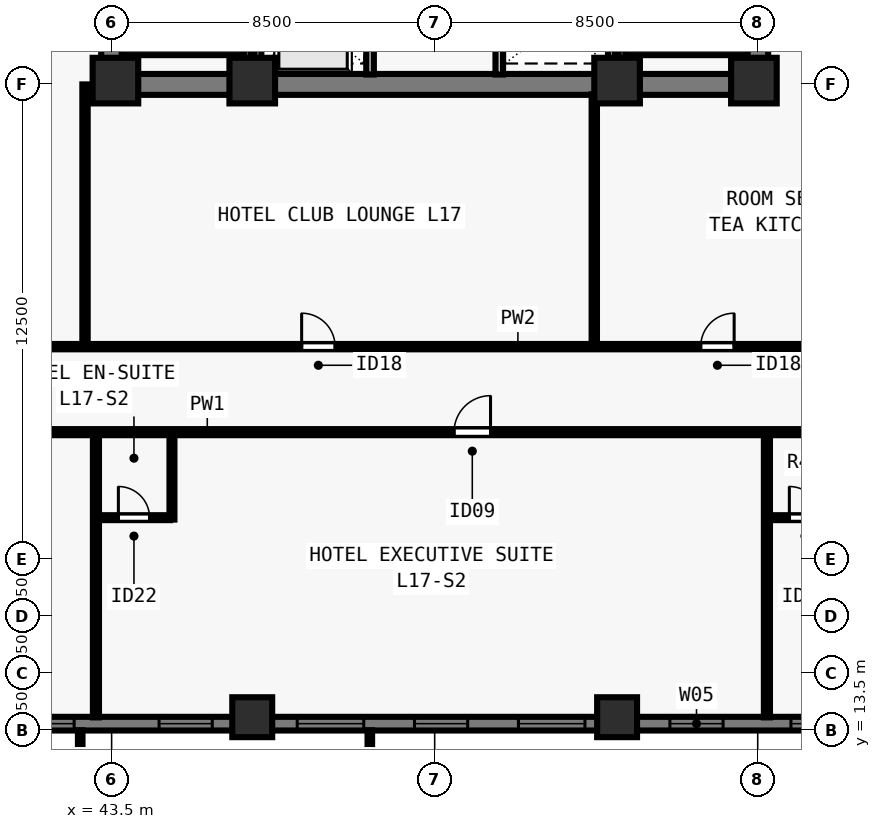
"""IFC4 building model, lengths in metres.
Left out: names, types, materials, properties, quantities, classifications, styles, units other than length and angle.
Written with IfcOpenShell. Run it as: python <this file> out.ifc"""

import sys

from ifc_helpers import new_model, si_unit, direction, frame, frame_2d, origin, origin_2d, place, context, subcontext, project, spatial, rectangle, extrude, element, fill, save


model = new_model("IFC4")
c1 = context("Model", 3, precision=1e-05, world=origin(), true_north=direction((0.0, 1.0)))
c2 = subcontext(c1, "Body", "Model", "MODEL_VIEW")
j1 = project(units=[si_unit("LENGTHUNIT", "METRE"), si_unit("PLANEANGLEUNIT", "RADIAN")], contexts=[c1])
p1 = place(None, origin())
s1 = spatial("IfcSite", under=j1, at=p1, CompositionType="ELEMENT")
p2 = place(p1, origin())
s2 = spatial("IfcBuilding", under=s1, at=p2, CompositionType="ELEMENT")
p3 = place(p2, frame((0.0, 0.0, 65.5)))
s3 = spatial("IfcBuildingStorey", under=s2, at=p3, CompositionType="ELEMENT", Elevation=65.5)
for number, where, z_axis, x_axis in (
    (1, (43.6, 30.6, 0.0), (0.0, 0.0, 1.0), (1.0, 0.0, 0.0)),
    (2, (47.2, 30.6, 0.0), (0.0, 0.0, 1.0), (1.0, 0.0, 0.0)),
    (3, (56.8, 30.6, 0.0), (0.0, 0.0, 1.0), (1.0, 0.0, 0.0)),
    (4, (60.4, 30.6, 0.0), (0.0, 0.0, 1.0), (1.0, 0.0, 0.0)),
):
    element("IfcColumn", number, at=place(p3, frame(where, z_axis=z_axis, x_axis=x_axis)), inside=s3, PredefinedType="COLUMN", context=c2, shape_type="SweptSolid", body=[
        extrude(rectangle(XDim=1.2, YDim=1.2, at=origin_2d()), origin(), (0.0, 0.0, 1.0), 3.5),
    ])
for number, where, z_axis, x_axis in (
    (5, (47.2, 13.85, 0.0), (0.0, 0.0, 1.0), (1.0, 0.0, 0.0)),
    (6, (56.8, 13.85, 0.0), (0.0, 0.0, 1.0), (1.0, 0.0, 0.0)),
):
    element("IfcColumn", number, at=place(p3, frame(where, z_axis=z_axis, x_axis=x_axis)), inside=s3, PredefinedType="COLUMN", context=c2, shape_type="SweptSolid", body=[
        extrude(rectangle(XDim=1.05, YDim=1.05, at=origin_2d()), origin(), (0.0, 0.0, 1.0), 3.5),
    ])
p4 = place(p3, frame((74.5, 13.68, 0.0), z_axis=(0.0, 0.0, 1.0), x_axis=(-1.0, 0.0, 0.0)))
e7 = element("IfcWall", 7, at=p4, inside=s3, PredefinedType="SOLIDWALL", context=c2, shape_type="SweptSolid", body=[
    extrude(rectangle(XDim=44.662, YDim=0.36, at=frame_2d((22.331, 0.0))), origin(), (0.0, 0.0, 1.0), 3.28),
])
p5 = place(p4, frame((4.655, 0.0, 0.8)))
e8 = element("IfcOpeningElement", 8, at=p5, cuts=e7, PredefinedType="OPENING", context=c2, shape_type="SweptSolid", body=[
    extrude(rectangle(XDim=1.75, YDim=1.544, at=frame_2d((0.875, 0.772))), frame((0.0, 0.19, 0.0), z_axis=(0.0, -1.0, 0.0), x_axis=(1.0, 0.0, 0.0)), (0.0, 0.0, 1.0), 0.38),
])
p6 = place(p4, frame((8.19, 0.0, 0.8)))
e9 = element("IfcOpeningElement", 9, at=p6, cuts=e7, PredefinedType="OPENING", context=c2, shape_type="SweptSolid", body=[
    extrude(rectangle(XDim=1.4, YDim=1.544, at=frame_2d((0.7, 0.772))), frame((0.0, 0.19, 0.0), z_axis=(0.0, -1.0, 0.0), x_axis=(1.0, 0.0, 0.0)), (0.0, 0.0, 1.0), 0.38),
])
p7 = place(p4, frame((11.375, 0.0, 0.8)))
e10 = element("IfcOpeningElement", 10, at=p7, cuts=e7, PredefinedType="OPENING", context=c2, shape_type="SweptSolid", body=[
    extrude(rectangle(XDim=1.75, YDim=1.544, at=frame_2d((0.875, 0.772))), frame((0.0, 0.19, 0.0), z_axis=(0.0, -1.0, 0.0), x_axis=(1.0, 0.0, 0.0)), (0.0, 0.0, 1.0), 0.38),
])
p8 = place(p4, frame((14.911, 0.0, 0.8)))
e11 = element("IfcOpeningElement", 11, at=p8, cuts=e7, PredefinedType="OPENING", context=c2, shape_type="SweptSolid", body=[
    extrude(rectangle(XDim=1.4, YDim=1.544, at=frame_2d((0.7, 0.772))), frame((0.0, 0.19, 0.0), z_axis=(0.0, -1.0, 0.0), x_axis=(1.0, 0.0, 0.0)), (0.0, 0.0, 1.0), 0.38),
])
p9 = place(p4, frame((18.546, 0.0, 0.8)))
e12 = element("IfcOpeningElement", 12, at=p9, cuts=e7, PredefinedType="OPENING", context=c2, shape_type="SweptSolid", body=[
    extrude(rectangle(XDim=1.75, YDim=1.544, at=frame_2d((0.875, 0.772))), frame((0.0, 0.19, 0.0), z_axis=(0.0, -1.0, 0.0), x_axis=(1.0, 0.0, 0.0)), (0.0, 0.0, 1.0), 0.38),
])
p10 = place(p4, frame((21.631, 0.0, 0.8)))
e13 = element("IfcOpeningElement", 13, at=p10, cuts=e7, PredefinedType="OPENING", context=c2, shape_type="SweptSolid", body=[
    extrude(rectangle(XDim=1.4, YDim=1.544, at=frame_2d((0.7, 0.772))), frame((0.0, 0.19, 0.0), z_axis=(0.0, -1.0, 0.0), x_axis=(1.0, 0.0, 0.0)), (0.0, 0.0, 1.0), 0.38),
])
p11 = place(p4, frame((24.366, 0.0, 0.8)))
e14 = element("IfcOpeningElement", 14, at=p11, cuts=e7, PredefinedType="OPENING", context=c2, shape_type="SweptSolid", body=[
    extrude(rectangle(XDim=1.75, YDim=1.544, at=frame_2d((0.875, 0.772))), frame((0.0, 0.19, 0.0), z_axis=(0.0, -1.0, 0.0), x_axis=(1.0, 0.0, 0.0)), (0.0, 0.0, 1.0), 0.38),
])
p12 = place(p4, frame((28.351, 0.0, 0.8)))
e15 = element("IfcOpeningElement", 15, at=p12, cuts=e7, PredefinedType="OPENING", context=c2, shape_type="SweptSolid", body=[
    extrude(rectangle(XDim=1.4, YDim=1.544, at=frame_2d((0.7, 0.772))), frame((0.0, 0.19, 0.0), z_axis=(0.0, -1.0, 0.0), x_axis=(1.0, 0.0, 0.0)), (0.0, 0.0, 1.0), 0.38),
])
p13 = place(p4, frame((31.987, 0.0, 0.8)))
e16 = element("IfcOpeningElement", 16, at=p13, cuts=e7, PredefinedType="OPENING", context=c2, shape_type="SweptSolid", body=[
    extrude(rectangle(XDim=1.75, YDim=1.544, at=frame_2d((0.875, 0.772))), frame((0.0, 0.19, 0.0), z_axis=(0.0, -1.0, 0.0), x_axis=(1.0, 0.0, 0.0)), (0.0, 0.0, 1.0), 0.38),
])
p14 = place(p4, frame((35.072, 0.0, 0.8)))
e17 = element("IfcOpeningElement", 17, at=p14, cuts=e7, PredefinedType="OPENING", context=c2, shape_type="SweptSolid", body=[
    extrude(rectangle(XDim=1.4, YDim=1.544, at=frame_2d((0.7, 0.772))), frame((0.0, 0.19, 0.0), z_axis=(0.0, -1.0, 0.0), x_axis=(1.0, 0.0, 0.0)), (0.0, 0.0, 1.0), 0.38),
])
p15 = place(p4, frame((38.257, 0.0, 0.8)))
e18 = element("IfcOpeningElement", 18, at=p15, cuts=e7, PredefinedType="OPENING", context=c2, shape_type="SweptSolid", body=[
    extrude(rectangle(XDim=1.75, YDim=1.544, at=frame_2d((0.875, 0.772))), frame((0.0, 0.19, 0.0), z_axis=(0.0, -1.0, 0.0), x_axis=(1.0, 0.0, 0.0)), (0.0, 0.0, 1.0), 0.38),
])
p16 = place(p3, frame((43.225, 30.5, 0.0), z_axis=(0.0, 0.0, 1.0), x_axis=(1.0, 0.0, 0.0)))
e19 = element("IfcWall", 19, at=p16, inside=s3, PredefinedType="SHEAR", context=c2, shape_type="SweptSolid", body=[
    extrude(rectangle(XDim=17.55, YDim=0.55, at=frame_2d((8.775, 0.0))), origin(), (0.0, 0.0, 1.0), 3.28),
])
for number, where, z_axis, x_axis in (
    (20, (43.5, 30.765, 0.0), (0.0, 0.0, 1.0), (0.0, 1.0, 0.0)),
    (21, (60.5, 30.765, 0.0), (0.0, 0.0, 1.0), (0.0, 1.0, 0.0)),
):
    element("IfcWall", number, at=place(p3, frame(where, z_axis=z_axis, x_axis=x_axis)), inside=s3, PredefinedType="SHEAR", context=c2, shape_type="SweptSolid", body=[
        extrude(rectangle(XDim=7.985, YDim=0.55, at=frame_2d((3.993, 0.0))), origin(), (0.0, 0.0, 1.0), 3.28),
    ])
p17 = place(p3, frame((50.3, 30.76, 0.0), z_axis=(0.0, 0.0, 1.0), x_axis=(0.0, 1.0, 0.0)))
e22 = element("IfcWall", 22, at=p17, inside=s3, PredefinedType="SOLIDWALL", context=c2, shape_type="SweptSolid", body=[
    extrude(rectangle(XDim=7.855, YDim=0.2, at=frame_2d((3.927, 0.0))), origin(), (0.0, 0.0, 1.0), 3.28),
])
p18 = place(p17, frame((0.79, 0.0, 0.0)))
e23 = element("IfcOpeningElement", 23, at=p18, cuts=e22, PredefinedType="OPENING", context=c2, shape_type="SweptSolid", body=[
    extrude(rectangle(XDim=1.1, YDim=2.2, at=frame_2d((0.55, 1.1))), frame((0.0, 0.11, 0.0), z_axis=(0.0, -1.0, 0.0), x_axis=(1.0, 0.0, 0.0)), (0.0, 0.0, 1.0), 0.22),
])
p19 = place(p17, frame((3.49, 0.0, 0.0)))
e24 = element("IfcOpeningElement", 24, at=p19, cuts=e22, PredefinedType="OPENING", context=c2, shape_type="SweptSolid", body=[
    extrude(rectangle(XDim=1.1, YDim=2.2, at=frame_2d((0.55, 1.1))), frame((0.0, 0.11, 0.0), z_axis=(0.0, -1.0, 0.0), x_axis=(1.0, 0.0, 0.0)), (0.0, 0.0, 1.0), 0.22),
])
p20 = place(p17, frame((6.19, 0.0, 0.0)))
e25 = element("IfcOpeningElement", 25, at=p20, cuts=e22, PredefinedType="OPENING", context=c2, shape_type="SweptSolid", body=[
    extrude(rectangle(XDim=1.1, YDim=2.2, at=frame_2d((0.55, 1.1))), frame((0.0, 0.11, 0.0), z_axis=(0.0, -1.0, 0.0), x_axis=(1.0, 0.0, 0.0)), (0.0, 0.0, 1.0), 0.22),
])
p21 = place(p3, frame((53.7, 30.76, 0.0), z_axis=(0.0, 0.0, 1.0), x_axis=(0.0, 1.0, 0.0)))
e26 = element("IfcWall", 26, at=p21, inside=s3, PredefinedType="SOLIDWALL", context=c2, shape_type="SweptSolid", body=[
    extrude(rectangle(XDim=7.855, YDim=0.2, at=frame_2d((3.927, 0.0))), origin(), (0.0, 0.0, 1.0), 3.28),
])
for number, where, z_axis, x_axis in (
    (27, (47.35, 30.76, 0.0), (0.0, 0.0, 1.0), (0.0, 1.0, 0.0)),
    (28, (56.65, 30.76, 0.0), (0.0, 0.0, 1.0), (0.0, 1.0, 0.0)),
):
    element("IfcWall", number, at=place(p3, frame(where, z_axis=z_axis, x_axis=x_axis)), inside=s3, PredefinedType="SOLIDWALL", context=c2, shape_type="SweptSolid", body=[
        extrude(rectangle(XDim=7.855, YDim=0.18, at=frame_2d((3.927, 0.0))), origin(), (0.0, 0.0, 1.0), 3.28),
    ])
p22 = place(p3, frame((34.95, 21.35, 0.0), z_axis=(0.0, 0.0, 1.0), x_axis=(1.0, 0.0, 0.0)))
e29 = element("IfcWall", 29, at=p22, inside=s3, PredefinedType="PARTITIONING", context=c2, shape_type="SweptSolid", body=[
    extrude(rectangle(XDim=34.1, YDim=0.16, at=frame_2d((17.05, 0.0))), origin(), (0.0, 0.0, 1.0), 3.28),
])
p23 = place(p22, frame((3.614, 0.0, 0.0)))
e30 = element("IfcOpeningElement", 30, at=p23, cuts=e29, PredefinedType="OPENING", context=c2, shape_type="SweptSolid", body=[
    extrude(rectangle(XDim=0.96, YDim=2.15, at=frame_2d((0.48, 1.075))), frame((0.0, 0.09, 0.0), z_axis=(0.0, -1.0, 0.0), x_axis=(1.0, 0.0, 0.0)), (0.0, 0.0, 1.0), 0.18),
])
p24 = place(p22, frame((17.56, 0.0, 0.0)))
e31 = element("IfcOpeningElement", 31, at=p24, cuts=e29, PredefinedType="OPENING", context=c2, shape_type="SweptSolid", body=[
    extrude(rectangle(XDim=0.96, YDim=2.15, at=frame_2d((0.48, 1.075))), frame((0.0, 0.09, 0.0), z_axis=(0.0, -1.0, 0.0), x_axis=(1.0, 0.0, 0.0)), (0.0, 0.0, 1.0), 0.18),
])
p25 = place(p22, frame((30.516, 0.0, 0.0)))
e32 = element("IfcOpeningElement", 32, at=p25, cuts=e29, PredefinedType="OPENING", context=c2, shape_type="SweptSolid", body=[
    extrude(rectangle(XDim=0.96, YDim=2.15, at=frame_2d((0.48, 1.075))), frame((0.0, 0.09, 0.0), z_axis=(0.0, -1.0, 0.0), x_axis=(1.0, 0.0, 0.0)), (0.0, 0.0, 1.0), 0.18),
])
p26 = place(p3, frame((37.2, 23.6, 0.0), z_axis=(0.0, 0.0, 1.0), x_axis=(1.0, 0.0, 0.0)))
e33 = element("IfcWall", 33, at=p26, inside=s3, PredefinedType="PARTITIONING", context=c2, shape_type="SweptSolid", body=[
    extrude(rectangle(XDim=29.6, YDim=0.14, at=frame_2d((14.8, 0.0))), origin(), (0.0, 0.0, 1.0), 3.28),
])
p27 = place(p26, frame((1.2, 0.0, 0.0)))
e34 = element("IfcOpeningElement", 34, at=p27, cuts=e33, PredefinedType="OPENING", context=c2, shape_type="SweptSolid", body=[
    extrude(rectangle(XDim=0.88, YDim=2.1, at=frame_2d((0.44, 1.05))), frame((0.0, 0.08, 0.0), z_axis=(0.0, -1.0, 0.0), x_axis=(1.0, 0.0, 0.0)), (0.0, 0.0, 1.0), 0.16),
])
p28 = place(p26, frame((11.3, 0.0, 0.0)))
e35 = element("IfcOpeningElement", 35, at=p28, cuts=e33, PredefinedType="OPENING", context=c2, shape_type="SweptSolid", body=[
    extrude(rectangle(XDim=0.88, YDim=2.1, at=frame_2d((0.44, 1.05))), frame((0.0, 0.08, 0.0), z_axis=(0.0, -1.0, 0.0), x_axis=(1.0, 0.0, 0.0)), (0.0, 0.0, 1.0), 0.16),
])
p29 = place(p26, frame((21.8, 0.0, 0.0)))
e36 = element("IfcOpeningElement", 36, at=p29, cuts=e33, PredefinedType="OPENING", context=c2, shape_type="SweptSolid", body=[
    extrude(rectangle(XDim=0.88, YDim=2.1, at=frame_2d((0.44, 1.05))), frame((0.0, 0.08, 0.0), z_axis=(0.0, -1.0, 0.0), x_axis=(1.0, 0.0, 0.0)), (0.0, 0.0, 1.0), 0.16),
])
p30 = place(p3, frame((42.8, 23.655, 0.0), z_axis=(0.0, 0.0, 1.0), x_axis=(0.0, 1.0, 0.0)))
e37 = element("IfcWall", 37, at=p30, inside=s3, PredefinedType="PARTITIONING", context=c2, shape_type="SweptSolid", body=[
    extrude(rectangle(XDim=6.845, YDim=0.14, at=frame_2d((3.422, 0.0))), origin(), (0.0, 0.0, 1.0), 2.439),
])
p31 = place(p3, frame((56.2, 23.655, 0.0), z_axis=(0.0, 0.0, 1.0), x_axis=(0.0, 1.0, 0.0)))
e38 = element("IfcWall", 38, at=p31, inside=s3, PredefinedType="PARTITIONING", context=c2, shape_type="SweptSolid", body=[
    extrude(rectangle(XDim=6.585, YDim=0.14, at=frame_2d((3.292, 0.0))), origin(), (0.0, 0.0, 1.0), 2.849),
])
p32 = place(p3, frame((43.087, 13.845, 0.0), z_axis=(0.0, 0.0, 1.0), x_axis=(0.0, 1.0, 0.0)))
e39 = element("IfcWall", 39, at=p32, inside=s3, PredefinedType="PARTITIONING", context=c2, shape_type="SweptSolid", body=[
    extrude(rectangle(XDim=7.44, YDim=0.16, at=frame_2d((3.72, 0.0))), origin(), (0.0, 0.0, 1.0), 3.28),
])
p33 = place(p3, frame((45.087, 19.05, 0.0), z_axis=(0.0, 0.0, 1.0), x_axis=(0.0, 1.0, 0.0)))
e40 = element("IfcWall", 40, at=p33, inside=s3, PredefinedType="PLUMBINGWALL", context=c2, shape_type="SweptSolid", body=[
    extrude(rectangle(XDim=2.235, YDim=0.13, at=frame_2d((1.117, 0.0))), origin(), (0.0, 0.0, 1.0), 3.28),
])
p34 = place(p3, frame((43.153, 19.1, 0.0), z_axis=(0.0, 0.0, 1.0), x_axis=(1.0, 0.0, 0.0)))
e41 = element("IfcWall", 41, at=p34, inside=s3, PredefinedType="PLUMBINGWALL", context=c2, shape_type="SweptSolid", body=[
    extrude(rectangle(XDim=1.885, YDim=0.13, at=frame_2d((0.942, 0.0))), origin(), (0.0, 0.0, 1.0), 3.28),
])
p35 = place(p34, frame((0.525, 0.0, 0.0)))
e42 = element("IfcOpeningElement", 42, at=p35, cuts=e41, PredefinedType="OPENING", context=c2, shape_type="SweptSolid", body=[
    extrude(rectangle(XDim=0.82, YDim=2.1, at=frame_2d((0.41, 1.05))), frame((0.0, 0.075, 0.0), z_axis=(0.0, -1.0, 0.0), x_axis=(1.0, 0.0, 0.0)), (0.0, 0.0, 1.0), 0.15),
])
p36 = place(p3, frame((60.742, 13.845, 0.0), z_axis=(0.0, 0.0, 1.0), x_axis=(0.0, 1.0, 0.0)))
e43 = element("IfcWall", 43, at=p36, inside=s3, PredefinedType="PARTITIONING", context=c2, shape_type="SweptSolid", body=[
    extrude(rectangle(XDim=7.44, YDim=0.16, at=frame_2d((3.72, 0.0))), origin(), (0.0, 0.0, 1.0), 3.28),
])
p37 = place(p3, frame((60.808, 19.1, 0.0), z_axis=(0.0, 0.0, 1.0), x_axis=(1.0, 0.0, 0.0)))
e44 = element("IfcWall", 44, at=p37, inside=s3, PredefinedType="PLUMBINGWALL", context=c2, shape_type="SweptSolid", body=[
    extrude(rectangle(XDim=1.885, YDim=0.13, at=frame_2d((0.942, 0.0))), origin(), (0.0, 0.0, 1.0), 3.28),
])
p38 = place(p37, frame((0.525, 0.0, 0.0)))
e45 = element("IfcOpeningElement", 45, at=p38, cuts=e44, PredefinedType="OPENING", context=c2, shape_type="SweptSolid", body=[
    extrude(rectangle(XDim=0.82, YDim=2.1, at=frame_2d((0.41, 1.05))), frame((0.0, 0.075, 0.0), z_axis=(0.0, -1.0, 0.0), x_axis=(1.0, 0.0, 0.0)), (0.0, 0.0, 1.0), 0.15),
])
p39 = place(p3, frame((43.765, 31.36, 0.0), z_axis=(0.0, 0.0, 1.0), x_axis=(1.0, 0.0, 0.0)))
e46 = element("IfcWall", 46, at=p39, inside=s3, PredefinedType="SOLIDWALL", context=c2, shape_type="SweptSolid", body=[
    extrude(rectangle(XDim=3.23, YDim=0.18, at=frame_2d((1.615, 0.0))), origin(), (0.0, 0.0, 1.0), 3.28),
])
p40 = place(p3, frame((47.07, 38.78, 0.0), z_axis=(0.0, 0.0, 1.0), x_axis=(0.0, -1.0, 0.0)))
e47 = element("IfcWall", 47, at=p40, inside=s3, PredefinedType="SOLIDWALL", context=c2, shape_type="SweptSolid", body=[
    extrude(rectangle(XDim=8.017, YDim=0.18, at=frame_2d((4.009, 0.0))), origin(), (0.0, 0.0, 1.0), 3.28),
])
p41 = place(p3, frame((57.005, 31.36, 0.0), z_axis=(0.0, 0.0, 1.0), x_axis=(1.0, 0.0, 0.0)))
e48 = element("IfcWall", 48, at=p41, inside=s3, PredefinedType="SOLIDWALL", context=c2, shape_type="SweptSolid", body=[
    extrude(rectangle(XDim=3.23, YDim=0.18, at=frame_2d((1.615, 0.0))), origin(), (0.0, 0.0, 1.0), 3.28),
])
p42 = place(p3, frame((56.93, 38.78, 0.0), z_axis=(0.0, 0.0, 1.0), x_axis=(0.0, -1.0, 0.0)))
e49 = element("IfcWall", 49, at=p42, inside=s3, PredefinedType="SOLIDWALL", context=c2, shape_type="SweptSolid", body=[
    extrude(rectangle(XDim=8.017, YDim=0.18, at=frame_2d((4.009, 0.0))), origin(), (0.0, 0.0, 1.0), 3.28),
])
p43 = place(p7, origin())
e50 = element("IfcWindow", 50, at=p43, inside=s3, PartitioningType="SINGLE_PANEL", PredefinedType="WINDOW", context=c2, shape_type="SweptSolid", body=[
    extrude(rectangle(XDim=1.75, YDim=1.544, at=frame_2d((0.875, 0.772))), frame((0.0, -0.05, 0.0), z_axis=(0.0, -1.0, 0.0), x_axis=(1.0, 0.0, 0.0)), (0.0, 0.0, 1.0), 0.06),
])
fill(e10, e50)
p44 = place(p8, origin())
e51 = element("IfcWindow", 51, at=p44, inside=s3, PartitioningType="SINGLE_PANEL", PredefinedType="WINDOW", context=c2, shape_type="SweptSolid", body=[
    extrude(rectangle(XDim=1.4, YDim=1.544, at=frame_2d((0.7, 0.772))), frame((0.0, -0.05, 0.0), z_axis=(0.0, -1.0, 0.0), x_axis=(1.0, 0.0, 0.0)), (0.0, 0.0, 1.0), 0.06),
])
fill(e11, e51)
p45 = place(p9, origin())
e52 = element("IfcWindow", 52, at=p45, inside=s3, PartitioningType="SINGLE_PANEL", PredefinedType="WINDOW", context=c2, shape_type="SweptSolid", body=[
    extrude(rectangle(XDim=1.75, YDim=1.544, at=frame_2d((0.875, 0.772))), frame((0.0, -0.05, 0.0), z_axis=(0.0, -1.0, 0.0), x_axis=(1.0, 0.0, 0.0)), (0.0, 0.0, 1.0), 0.06),
])
fill(e12, e52)
p46 = place(p10, origin())
e53 = element("IfcWindow", 53, at=p46, inside=s3, PartitioningType="SINGLE_PANEL", PredefinedType="WINDOW", context=c2, shape_type="SweptSolid", body=[
    extrude(rectangle(XDim=1.4, YDim=1.544, at=frame_2d((0.7, 0.772))), frame((0.0, -0.05, 0.0), z_axis=(0.0, -1.0, 0.0), x_axis=(1.0, 0.0, 0.0)), (0.0, 0.0, 1.0), 0.06),
])
fill(e13, e53)
p47 = place(p11, origin())
e54 = element("IfcWindow", 54, at=p47, inside=s3, PartitioningType="SINGLE_PANEL", PredefinedType="WINDOW", context=c2, shape_type="SweptSolid", body=[
    extrude(rectangle(XDim=1.75, YDim=1.544, at=frame_2d((0.875, 0.772))), frame((0.0, -0.05, 0.0), z_axis=(0.0, -1.0, 0.0), x_axis=(1.0, 0.0, 0.0)), (0.0, 0.0, 1.0), 0.06),
])
fill(e14, e54)
p48 = place(p12, origin())
e55 = element("IfcWindow", 55, at=p48, inside=s3, PartitioningType="SINGLE_PANEL", PredefinedType="WINDOW", context=c2, shape_type="SweptSolid", body=[
    extrude(rectangle(XDim=1.4, YDim=1.544, at=frame_2d((0.7, 0.772))), frame((0.0, -0.05, 0.0), z_axis=(0.0, -1.0, 0.0), x_axis=(1.0, 0.0, 0.0)), (0.0, 0.0, 1.0), 0.06),
])
fill(e15, e55)
p49 = place(p13, origin())
e56 = element("IfcWindow", 56, at=p49, inside=s3, PartitioningType="SINGLE_PANEL", PredefinedType="WINDOW", context=c2, shape_type="SweptSolid", body=[
    extrude(rectangle(XDim=1.75, YDim=1.544, at=frame_2d((0.875, 0.772))), frame((0.0, -0.05, 0.0), z_axis=(0.0, -1.0, 0.0), x_axis=(1.0, 0.0, 0.0)), (0.0, 0.0, 1.0), 0.06),
])
fill(e16, e56)
p50 = place(p28, origin())
e57 = element("IfcDoor", 57, at=p50, inside=s3, OperationType="SINGLE_SWING_LEFT", PredefinedType="DOOR", context=c2, shape_type="SweptSolid", body=[
    extrude(rectangle(XDim=0.88, YDim=2.1, at=frame_2d((0.44, 1.05))), frame((0.0, 0.025, 0.0), z_axis=(0.0, -1.0, 0.0), x_axis=(1.0, 0.0, 0.0)), (0.0, 0.0, 1.0), 0.05),
])
fill(e35, e57)
p51 = place(p29, origin())
e58 = element("IfcDoor", 58, at=p51, inside=s3, OperationType="SINGLE_SWING_RIGHT", PredefinedType="DOOR", context=c2, shape_type="SweptSolid", body=[
    extrude(rectangle(XDim=0.88, YDim=2.1, at=frame_2d((0.44, 1.05))), frame((0.0, 0.025, 0.0), z_axis=(0.0, -1.0, 0.0), x_axis=(1.0, 0.0, 0.0)), (0.0, 0.0, 1.0), 0.05),
])
fill(e36, e58)
p52 = place(p35, origin())
e59 = element("IfcDoor", 59, at=p52, inside=s3, OperationType="SINGLE_SWING_LEFT", PredefinedType="DOOR", context=c2, shape_type="SweptSolid", body=[
    extrude(rectangle(XDim=0.82, YDim=2.1, at=frame_2d((0.41, 1.05))), frame((0.0, 0.025, 0.0), z_axis=(0.0, -1.0, 0.0), x_axis=(1.0, 0.0, 0.0)), (0.0, 0.0, 1.0), 0.05),
])
fill(e42, e59)
p53 = place(p24, origin())
e60 = element("IfcDoor", 60, at=p53, inside=s3, OperationType="SINGLE_SWING_RIGHT", PredefinedType="DOOR", context=c2, shape_type="SweptSolid", body=[
    extrude(rectangle(XDim=0.96, YDim=2.15, at=frame_2d((0.48, 1.075))), frame((0.0, 0.025, 0.0), z_axis=(0.0, -1.0, 0.0), x_axis=(1.0, 0.0, 0.0)), (0.0, 0.0, 1.0), 0.05),
])
fill(e31, e60)
p54 = place(p38, origin())
e61 = element("IfcDoor", 61, at=p54, inside=s3, OperationType="SINGLE_SWING_LEFT", PredefinedType="DOOR", context=c2, shape_type="SweptSolid", body=[
    extrude(rectangle(XDim=0.82, YDim=2.1, at=frame_2d((0.41, 1.05))), frame((0.0, 0.025, 0.0), z_axis=(0.0, -1.0, 0.0), x_axis=(1.0, 0.0, 0.0)), (0.0, 0.0, 1.0), 0.05),
])
fill(e45, e61)
save(model, sys.argv[1])
